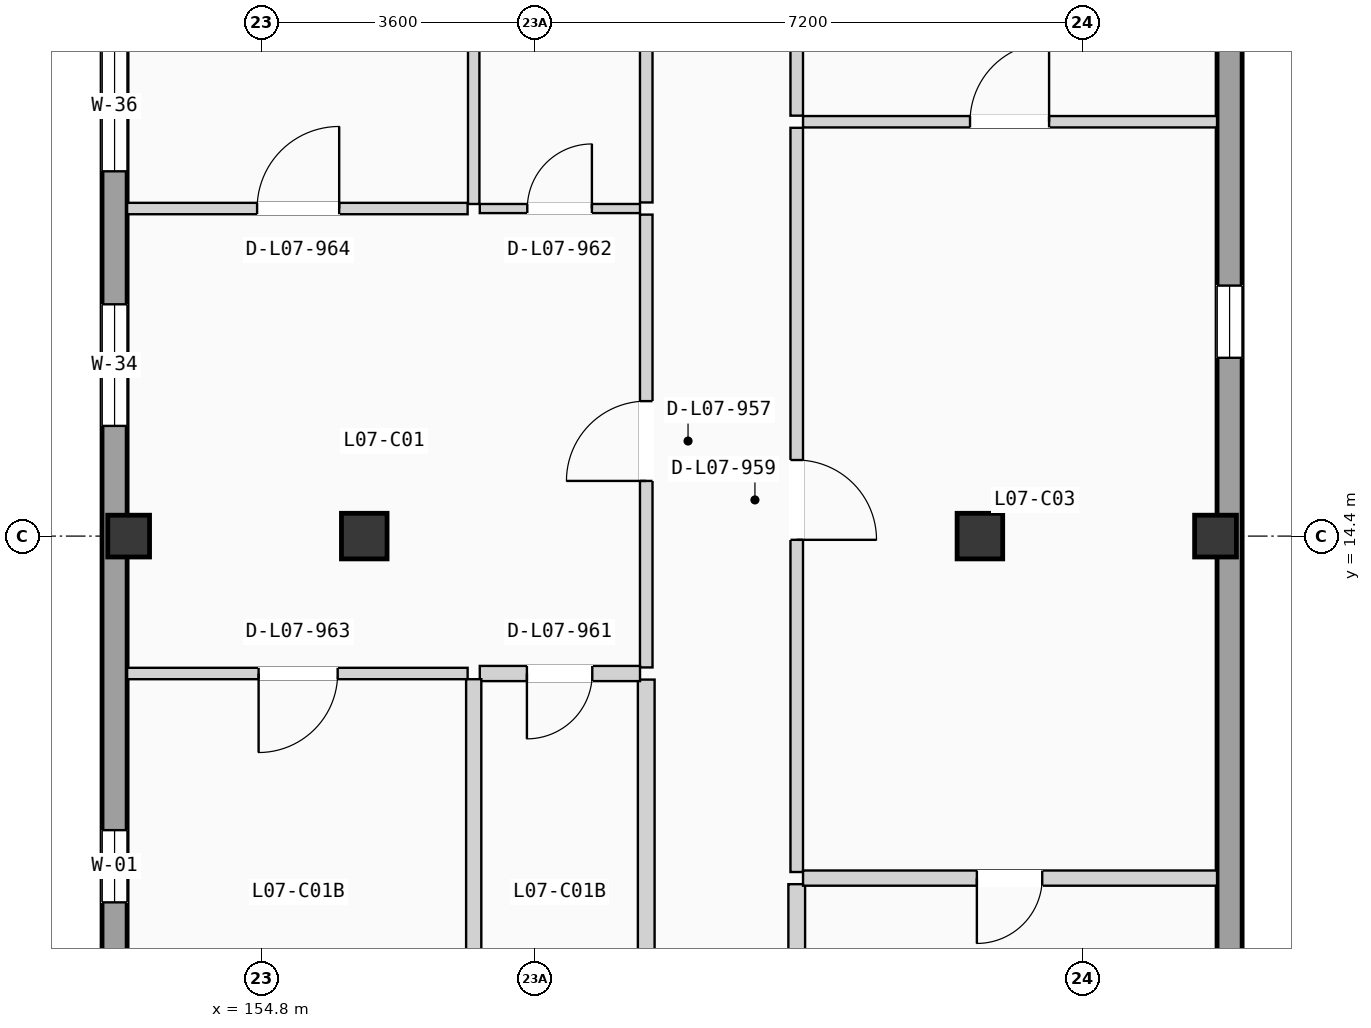
"""IFC4 building model, lengths in metres.
Left out: names, types, materials, properties, quantities, classifications, styles, units other than length and angle.
Written with IfcOpenShell. Run it as: python <this file> out.ifc"""

import sys

from ifc_helpers import new_model, si_unit, direction, frame, frame_2d, origin, origin_2d, place, context, subcontext, project, spatial, rectangle, extrude, element, fill, save


model = new_model("IFC4")
c1 = context("Model", 3, precision=1e-05, world=origin(), true_north=direction((0.0, 1.0)))
c2 = subcontext(c1, "Body", "Model", "MODEL_VIEW")
j1 = project(units=[si_unit("LENGTHUNIT", "METRE"), si_unit("PLANEANGLEUNIT", "RADIAN")], contexts=[c1])
p1 = place(None, origin())
s1 = spatial("IfcSite", under=j1, at=p1, CompositionType="ELEMENT")
p2 = place(p1, origin())
s2 = spatial("IfcBuilding", under=s1, at=p2, CompositionType="ELEMENT")
p3 = place(p2, frame((0.0, 0.0, 24.675)))
s3 = spatial("IfcBuildingStorey", under=s2, at=p3, CompositionType="ELEMENT", Elevation=24.675)
p4 = place(p3, frame((153.05, 14.4, 0.0), z_axis=(0.0, 0.0, 1.0), x_axis=(1.0, 0.0, 0.0)))
e1 = element("IfcColumn", 1, at=p4, inside=s3, PredefinedType="COLUMN", context=c2, shape_type="SweptSolid", body=[
    extrude(rectangle(XDim=0.55, YDim=0.55, at=origin_2d()), origin(), (0.0, 0.0, 1.0), 3.15),
])
for number, where, z_axis, x_axis in (
    (2, (156.15, 14.4, 0.0), (0.0, 0.0, 1.0), (1.0, 0.0, 0.0)),
    (3, (164.25, 14.4, 0.0), (0.0, 0.0, 1.0), (1.0, 0.0, 0.0)),
):
    element("IfcColumn", number, at=place(p3, frame(where, z_axis=z_axis, x_axis=x_axis)), inside=s3, PredefinedType="COLUMN", context=c2, shape_type="SweptSolid", body=[
        extrude(rectangle(XDim=0.6, YDim=0.6, at=origin_2d()), origin(), (0.0, 0.0, 1.0), 3.15),
    ])
p5 = place(p3, frame((167.35, 14.4, 0.0), z_axis=(0.0, 0.0, 1.0), x_axis=(1.0, 0.0, 0.0)))
e4 = element("IfcColumn", 4, at=p5, inside=s3, PredefinedType="COLUMN", context=c2, shape_type="SweptSolid", body=[
    extrude(rectangle(XDim=0.55, YDim=0.55, at=origin_2d()), origin(), (0.0, 0.0, 1.0), 3.15),
])
p6 = place(p3, frame((152.865, 0.33, 0.0), z_axis=(0.0, 0.0, 1.0), x_axis=(0.0, 1.0, 0.0)))
e5 = element("IfcWall", 5, at=p6, inside=s3, PredefinedType="SOLIDWALL", context=c2, shape_type="SweptSolid", body=[
    extrude(rectangle(XDim=49.74, YDim=0.33, at=frame_2d((24.87, 0.0))), origin(), (0.0, 0.0, 1.0), 2.9),
])
p7 = place(p6, frame((15.52, 0.0, 0.565)))
e6 = element("IfcOpeningElement", 6, at=p7, cuts=e5, PredefinedType="OPENING", context=c2, shape_type="SweptSolid", body=[
    extrude(rectangle(XDim=1.6, YDim=1.65, at=frame_2d((0.8, 0.825))), frame((0.0, 0.175, 0.0), z_axis=(0.0, -1.0, 0.0), x_axis=(1.0, 0.0, 0.0)), (0.0, 0.0, 1.0), 0.35),
])
p8 = place(p6, frame((9.251, 0.0, 0.85)))
e7 = element("IfcOpeningElement", 7, at=p8, cuts=e5, PredefinedType="OPENING", context=c2, shape_type="SweptSolid", body=[
    extrude(rectangle(XDim=0.95, YDim=1.2, at=frame_2d((0.475, 0.6))), frame((0.0, 0.175, 0.0), z_axis=(0.0, -1.0, 0.0), x_axis=(1.0, 0.0, 0.0)), (0.0, 0.0, 1.0), 0.35),
])
p9 = place(p6, frame((18.87, 0.0, 0.9)))
e8 = element("IfcOpeningElement", 8, at=p9, cuts=e5, PredefinedType="OPENING", context=c2, shape_type="SweptSolid", body=[
    extrude(rectangle(XDim=1.72, YDim=1.2, at=frame_2d((0.86, 0.6))), frame((0.0, 0.175, 0.0), z_axis=(0.0, -1.0, 0.0), x_axis=(1.0, 0.0, 0.0)), (0.0, 0.0, 1.0), 0.35),
])
p10 = place(p6, frame((31.588, 0.0, 0.865)))
e9 = element("IfcOpeningElement", 9, at=p10, cuts=e5, PredefinedType="OPENING", context=c2, shape_type="SweptSolid", body=[
    extrude(rectangle(XDim=1.72, YDim=1.35, at=frame_2d((0.86, 0.675))), frame((0.0, 0.175, 0.0), z_axis=(0.0, -1.0, 0.0), x_axis=(1.0, 0.0, 0.0)), (0.0, 0.0, 1.0), 0.35),
])
p11 = place(p6, frame((25.016, 0.0, 0.715)))
e10 = element("IfcOpeningElement", 10, at=p11, cuts=e5, PredefinedType="OPENING", context=c2, shape_type="SweptSolid", body=[
    extrude(rectangle(XDim=1.72, YDim=1.5, at=frame_2d((0.86, 0.75))), frame((0.0, 0.175, 0.0), z_axis=(0.0, -1.0, 0.0), x_axis=(1.0, 0.0, 0.0)), (0.0, 0.0, 1.0), 0.35),
])
p12 = place(p6, frame((38.718, 0.0, 0.565)))
e11 = element("IfcOpeningElement", 11, at=p12, cuts=e5, PredefinedType="OPENING", context=c2, shape_type="SweptSolid", body=[
    extrude(rectangle(XDim=1.72, YDim=1.65, at=frame_2d((0.86, 0.825))), frame((0.0, 0.175, 0.0), z_axis=(0.0, -1.0, 0.0), x_axis=(1.0, 0.0, 0.0)), (0.0, 0.0, 1.0), 0.35),
])
p13 = place(p3, frame((167.535, 0.33, 0.0), z_axis=(0.0, 0.0, 1.0), x_axis=(0.0, 1.0, 0.0)))
e12 = element("IfcWall", 12, at=p13, inside=s3, PredefinedType="SOLIDWALL", context=c2, shape_type="SweptSolid", body=[
    extrude(rectangle(XDim=49.74, YDim=0.33, at=frame_2d((24.87, 0.0))), origin(), (0.0, 0.0, 1.0), 2.9),
])
p14 = place(p13, frame((16.416, 0.0, 0.85)))
e13 = element("IfcOpeningElement", 13, at=p14, cuts=e12, PredefinedType="OPENING", context=c2, shape_type="SweptSolid", body=[
    extrude(rectangle(XDim=0.95, YDim=1.2, at=frame_2d((0.475, 0.6))), frame((0.0, 0.175, 0.0), z_axis=(0.0, -1.0, 0.0), x_axis=(1.0, 0.0, 0.0)), (0.0, 0.0, 1.0), 0.35),
])
p15 = place(p13, frame((21.981, 0.0, 0.85)))
e14 = element("IfcOpeningElement", 14, at=p15, cuts=e12, PredefinedType="OPENING", context=c2, shape_type="SweptSolid", body=[
    extrude(rectangle(XDim=0.95, YDim=1.2, at=frame_2d((0.475, 0.6))), frame((0.0, 0.175, 0.0), z_axis=(0.0, -1.0, 0.0), x_axis=(1.0, 0.0, 0.0)), (0.0, 0.0, 1.0), 0.35),
])
p16 = place(p13, frame((31.145, 0.0, 0.865)))
e15 = element("IfcOpeningElement", 15, at=p16, cuts=e12, PredefinedType="OPENING", context=c2, shape_type="SweptSolid", body=[
    extrude(rectangle(XDim=1.85, YDim=1.35, at=frame_2d((0.925, 0.675))), frame((0.0, 0.175, 0.0), z_axis=(0.0, -1.0, 0.0), x_axis=(1.0, 0.0, 0.0)), (0.0, 0.0, 1.0), 0.35),
])
p17 = place(p3, frame((159.86, 12.672, 0.0), z_axis=(0.0, 0.0, 1.0), x_axis=(0.0, 1.0, 0.0)))
e16 = element("IfcWall", 16, at=p17, inside=s3, PredefinedType="PARTITIONING", context=c2, shape_type="SweptSolid", body=[
    extrude(rectangle(XDim=5.958, YDim=0.165, at=frame_2d((2.979, 0.0))), origin(), (0.0, 0.0, 1.0), 2.87),
])
p18 = place(p17, frame((2.454, 0.0, 0.0)))
e17 = element("IfcOpeningElement", 17, at=p18, cuts=e16, PredefinedType="OPENING", context=c2, shape_type="SweptSolid", body=[
    extrude(rectangle(XDim=1.05, YDim=2.13, at=frame_2d((0.525, 1.065))), frame((0.0, 0.093, 0.0), z_axis=(0.0, -1.0, 0.0), x_axis=(1.0, 0.0, 0.0)), (0.0, 0.0, 1.0), 0.185),
])
p19 = place(p3, frame((159.86, 7.6, 0.0), z_axis=(0.0, 0.0, 1.0), x_axis=(0.0, 1.0, 0.0)))
e18 = element("IfcWall", 18, at=p19, inside=s3, PredefinedType="PLUMBINGWALL", context=c2, shape_type="SweptSolid", body=[
    extrude(rectangle(XDim=4.912, YDim=0.22, at=frame_2d((2.456, 0.0))), origin(), (0.0, 0.0, 1.0), 2.87),
])
p20 = place(p3, frame((159.86, 18.79, 0.0), z_axis=(0.0, 0.0, 1.0), x_axis=(0.0, 1.0, 0.0)))
e19 = element("IfcWall", 19, at=p20, inside=s3, PredefinedType="PARTITIONING", context=c2, shape_type="SweptSolid", body=[
    extrude(rectangle(XDim=4.912, YDim=0.165, at=frame_2d((2.456, 0.0))), origin(), (0.0, 0.0, 1.0), 2.87),
])
p21 = place(p3, frame((161.84, 7.575, 0.0), z_axis=(0.0, 0.0, 1.0), x_axis=(0.0, 1.0, 0.0)))
e20 = element("IfcWall", 20, at=p21, inside=s3, PredefinedType="PLUMBINGWALL", context=c2, shape_type="SweptSolid", body=[
    extrude(rectangle(XDim=2.245, YDim=0.22, at=frame_2d((1.123, 0.0))), origin(), (0.0, 0.0, 1.0), 2.87),
])
p22 = place(p3, frame((161.84, 9.98, 0.0), z_axis=(0.0, 0.0, 1.0), x_axis=(0.0, 1.0, 0.0)))
e21 = element("IfcWall", 21, at=p22, inside=s3, PredefinedType="PARTITIONING", context=c2, shape_type="SweptSolid", body=[
    extrude(rectangle(XDim=9.792, YDim=0.165, at=frame_2d((4.896, 0.0))), origin(), (0.0, 0.0, 1.0), 2.87),
])
p23 = place(p22, frame((4.371, 0.0, 0.0)))
e22 = element("IfcOpeningElement", 22, at=p23, cuts=e21, PredefinedType="OPENING", context=c2, shape_type="SweptSolid", body=[
    extrude(rectangle(XDim=1.05, YDim=2.13, at=frame_2d((0.525, 1.065))), frame((0.0, 0.093, 0.0), z_axis=(0.0, -1.0, 0.0), x_axis=(1.0, 0.0, 0.0)), (0.0, 0.0, 1.0), 0.185),
])
p24 = place(p3, frame((161.84, 19.932, 0.0), z_axis=(0.0, 0.0, 1.0), x_axis=(0.0, 1.0, 0.0)))
e23 = element("IfcWall", 23, at=p24, inside=s3, PredefinedType="PARTITIONING", context=c2, shape_type="SweptSolid", body=[
    extrude(rectangle(XDim=3.77, YDim=0.165, at=frame_2d((1.885, 0.0))), origin(), (0.0, 0.0, 1.0), 2.87),
])
p25 = place(p3, frame((157.67, 12.592, 0.0), z_axis=(0.0, 0.0, 1.0), x_axis=(1.0, 0.0, 0.0)))
e24 = element("IfcWall", 24, at=p25, inside=s3, PredefinedType="PLUMBINGWALL", context=c2, shape_type="SweptSolid", body=[
    extrude(rectangle(XDim=2.108, YDim=0.2, at=frame_2d((1.054, 0.0))), origin(), (0.0, 0.0, 1.0), 2.87),
])
p26 = place(p25, frame((0.62, 0.0, 0.0)))
e25 = element("IfcOpeningElement", 25, at=p26, cuts=e24, PredefinedType="OPENING", context=c2, shape_type="SweptSolid", body=[
    extrude(rectangle(XDim=0.86, YDim=2.0, at=frame_2d((0.43, 1.0))), frame((0.0, 0.11, 0.0), z_axis=(0.0, -1.0, 0.0), x_axis=(1.0, 0.0, 0.0)), (0.0, 0.0, 1.0), 0.22),
])
p27 = place(p3, frame((157.67, 18.71, 0.0), z_axis=(0.0, 0.0, 1.0), x_axis=(1.0, 0.0, 0.0)))
e26 = element("IfcWall", 26, at=p27, inside=s3, PredefinedType="PARTITIONING", context=c2, shape_type="SweptSolid", body=[
    extrude(rectangle(XDim=2.108, YDim=0.12, at=frame_2d((1.054, 0.0))), origin(), (0.0, 0.0, 1.0), 2.87),
])
p28 = place(p27, frame((0.625, 0.0, 0.0)))
e27 = element("IfcOpeningElement", 27, at=p28, cuts=e26, PredefinedType="OPENING", context=c2, shape_type="SweptSolid", body=[
    extrude(rectangle(XDim=0.85, YDim=2.01, at=frame_2d((0.425, 1.005))), frame((0.0, 0.07, 0.0), z_axis=(0.0, -1.0, 0.0), x_axis=(1.0, 0.0, 0.0)), (0.0, 0.0, 1.0), 0.14),
])
p29 = place(p3, frame((153.03, 12.592, 0.0), z_axis=(0.0, 0.0, 1.0), x_axis=(1.0, 0.0, 0.0)))
e28 = element("IfcWall", 28, at=p29, inside=s3, PredefinedType="PARTITIONING", context=c2, shape_type="SweptSolid", body=[
    extrude(rectangle(XDim=4.48, YDim=0.15, at=frame_2d((2.24, 0.0))), origin(), (0.0, 0.0, 1.0), 2.87),
])
p30 = place(p29, frame((1.73, 0.0, 0.0)))
e29 = element("IfcOpeningElement", 29, at=p30, cuts=e28, PredefinedType="OPENING", context=c2, shape_type="SweptSolid", body=[
    extrude(rectangle(XDim=1.04, YDim=2.08, at=frame_2d((0.52, 1.04))), frame((0.0, 0.085, 0.0), z_axis=(0.0, -1.0, 0.0), x_axis=(1.0, 0.0, 0.0)), (0.0, 0.0, 1.0), 0.17),
])
p31 = place(p3, frame((153.03, 18.71, 0.0), z_axis=(0.0, 0.0, 1.0), x_axis=(1.0, 0.0, 0.0)))
e30 = element("IfcWall", 30, at=p31, inside=s3, PredefinedType="PARTITIONING", context=c2, shape_type="SweptSolid", body=[
    extrude(rectangle(XDim=4.48, YDim=0.15, at=frame_2d((2.24, 0.0))), origin(), (0.0, 0.0, 1.0), 2.87),
])
p32 = place(p31, frame((1.71, 0.0, 0.0)))
e31 = element("IfcOpeningElement", 31, at=p32, cuts=e30, PredefinedType="OPENING", context=c2, shape_type="SweptSolid", body=[
    extrude(rectangle(XDim=1.08, YDim=2.1, at=frame_2d((0.54, 1.05))), frame((0.0, 0.085, 0.0), z_axis=(0.0, -1.0, 0.0), x_axis=(1.0, 0.0, 0.0)), (0.0, 0.0, 1.0), 0.17),
])
p33 = place(p3, frame((157.59, 7.6, 0.0), z_axis=(0.0, 0.0, 1.0), x_axis=(0.0, 1.0, 0.0)))
e32 = element("IfcWall", 32, at=p33, inside=s3, PredefinedType="PLUMBINGWALL", context=c2, shape_type="SweptSolid", body=[
    extrude(rectangle(XDim=4.917, YDim=0.2, at=frame_2d((2.458, 0.0))), origin(), (0.0, 0.0, 1.0), 2.87),
])
p34 = place(p3, frame((157.59, 18.77, 0.0), z_axis=(0.0, 0.0, 1.0), x_axis=(0.0, 1.0, 0.0)))
e33 = element("IfcWall", 33, at=p34, inside=s3, PredefinedType="PARTITIONING", context=c2, shape_type="SweptSolid", body=[
    extrude(rectangle(XDim=4.932, YDim=0.15, at=frame_2d((2.466, 0.0))), origin(), (0.0, 0.0, 1.0), 2.87),
])
p35 = place(p3, frame((161.923, 9.9, 0.0), z_axis=(0.0, 0.0, 1.0), x_axis=(1.0, 0.0, 0.0)))
e34 = element("IfcWall", 34, at=p35, inside=s3, PredefinedType="PLUMBINGWALL", context=c2, shape_type="SweptSolid", body=[
    extrude(rectangle(XDim=5.447, YDim=0.2, at=frame_2d((2.724, 0.0))), origin(), (0.0, 0.0, 1.0), 2.87),
])
p36 = place(p35, frame((2.287, 0.0, 0.0)))
e35 = element("IfcOpeningElement", 35, at=p36, cuts=e34, PredefinedType="OPENING", context=c2, shape_type="SweptSolid", body=[
    extrude(rectangle(XDim=0.86, YDim=2.0, at=frame_2d((0.43, 1.0))), frame((0.0, 0.11, 0.0), z_axis=(0.0, -1.0, 0.0), x_axis=(1.0, 0.0, 0.0)), (0.0, 0.0, 1.0), 0.22),
])
p37 = place(p3, frame((161.923, 19.852, 0.0), z_axis=(0.0, 0.0, 1.0), x_axis=(1.0, 0.0, 0.0)))
e36 = element("IfcWall", 36, at=p37, inside=s3, PredefinedType="PARTITIONING", context=c2, shape_type="SweptSolid", body=[
    extrude(rectangle(XDim=5.447, YDim=0.15, at=frame_2d((2.724, 0.0))), origin(), (0.0, 0.0, 1.0), 2.87),
])
p38 = place(p37, frame((2.197, 0.0, 0.0)))
e37 = element("IfcOpeningElement", 37, at=p38, cuts=e36, PredefinedType="OPENING", context=c2, shape_type="SweptSolid", body=[
    extrude(rectangle(XDim=1.04, YDim=2.08, at=frame_2d((0.52, 1.04))), frame((0.0, 0.085, 0.0), z_axis=(0.0, -1.0, 0.0), x_axis=(1.0, 0.0, 0.0)), (0.0, 0.0, 1.0), 0.17),
])
p39 = place(p7, origin())
e38 = element("IfcWindow", 38, at=p39, inside=s3, PartitioningType="DOUBLE_PANEL_VERTICAL", PredefinedType="WINDOW", context=c2, shape_type="SweptSolid", body=[
    extrude(rectangle(XDim=1.6, YDim=1.65, at=frame_2d((0.8, 0.825))), frame((0.0, 0.03, 0.0), z_axis=(0.0, -1.0, 0.0), x_axis=(1.0, 0.0, 0.0)), (0.0, 0.0, 1.0), 0.06),
])
fill(e6, e38)
p40 = place(p8, origin())
e39 = element("IfcWindow", 39, at=p40, inside=s3, PartitioningType="SINGLE_PANEL", PredefinedType="WINDOW", context=c2, shape_type="SweptSolid", body=[
    extrude(rectangle(XDim=0.95, YDim=1.2, at=frame_2d((0.475, 0.6))), frame((0.0, 0.03, 0.0), z_axis=(0.0, -1.0, 0.0), x_axis=(1.0, 0.0, 0.0)), (0.0, 0.0, 1.0), 0.06),
])
fill(e7, e39)
p41 = place(p9, origin())
e40 = element("IfcWindow", 40, at=p41, inside=s3, PartitioningType="DOUBLE_PANEL_VERTICAL", PredefinedType="WINDOW", context=c2, shape_type="SweptSolid", body=[
    extrude(rectangle(XDim=1.72, YDim=1.2, at=frame_2d((0.86, 0.6))), frame((0.0, 0.03, 0.0), z_axis=(0.0, -1.0, 0.0), x_axis=(1.0, 0.0, 0.0)), (0.0, 0.0, 1.0), 0.06),
])
fill(e8, e40)
p42 = place(p14, origin())
e41 = element("IfcWindow", 41, at=p42, inside=s3, PartitioningType="SINGLE_PANEL", PredefinedType="WINDOW", context=c2, shape_type="SweptSolid", body=[
    extrude(rectangle(XDim=0.95, YDim=1.2, at=frame_2d((0.475, 0.6))), frame((0.0, 0.03, 0.0), z_axis=(0.0, -1.0, 0.0), x_axis=(1.0, 0.0, 0.0)), (0.0, 0.0, 1.0), 0.06),
])
fill(e13, e41)
p43 = place(p18, origin())
e42 = element("IfcDoor", 42, at=p43, inside=s3, OperationType="SINGLE_SWING_LEFT", PredefinedType="DOOR", context=c2, shape_type="SweptSolid", body=[
    extrude(rectangle(XDim=1.05, YDim=2.13, at=frame_2d((0.525, 1.065))), frame((0.0, 0.025, 0.0), z_axis=(0.0, -1.0, 0.0), x_axis=(1.0, 0.0, 0.0)), (0.0, 0.0, 1.0), 0.05),
])
fill(e17, e42)
p44 = place(p23, frame((1.05, 0.0, 0.0), z_axis=(0.0, 0.0, 1.0), x_axis=(-1.0, 0.0, 0.0)))
e43 = element("IfcDoor", 43, at=p44, inside=s3, OperationType="SINGLE_SWING_LEFT", PredefinedType="DOOR", context=c2, shape_type="SweptSolid", body=[
    extrude(rectangle(XDim=1.05, YDim=2.13, at=frame_2d((0.525, 1.065))), frame((0.0, 0.025, 0.0), z_axis=(0.0, -1.0, 0.0), x_axis=(1.0, 0.0, 0.0)), (0.0, 0.0, 1.0), 0.05),
])
fill(e22, e43)
p45 = place(p26, frame((0.86, 0.0, 0.0), z_axis=(0.0, 0.0, 1.0), x_axis=(-1.0, 0.0, 0.0)))
e44 = element("IfcDoor", 44, at=p45, inside=s3, OperationType="SINGLE_SWING_LEFT", PredefinedType="DOOR", context=c2, shape_type="SweptSolid", body=[
    extrude(rectangle(XDim=0.86, YDim=2.0, at=frame_2d((0.43, 1.0))), frame((0.0, 0.025, 0.0), z_axis=(0.0, -1.0, 0.0), x_axis=(1.0, 0.0, 0.0)), (0.0, 0.0, 1.0), 0.05),
])
fill(e25, e44)
p46 = place(p28, origin())
e45 = element("IfcDoor", 45, at=p46, inside=s3, OperationType="SINGLE_SWING_RIGHT", PredefinedType="DOOR", context=c2, shape_type="SweptSolid", body=[
    extrude(rectangle(XDim=0.85, YDim=2.01, at=frame_2d((0.425, 1.005))), frame((0.0, 0.025, 0.0), z_axis=(0.0, -1.0, 0.0), x_axis=(1.0, 0.0, 0.0)), (0.0, 0.0, 1.0), 0.05),
])
fill(e27, e45)
p47 = place(p30, frame((1.04, 0.0, 0.0), z_axis=(0.0, 0.0, 1.0), x_axis=(-1.0, 0.0, 0.0)))
e46 = element("IfcDoor", 46, at=p47, inside=s3, OperationType="SINGLE_SWING_LEFT", PredefinedType="DOOR", context=c2, shape_type="SweptSolid", body=[
    extrude(rectangle(XDim=1.04, YDim=2.08, at=frame_2d((0.52, 1.04))), frame((0.0, 0.025, 0.0), z_axis=(0.0, -1.0, 0.0), x_axis=(1.0, 0.0, 0.0)), (0.0, 0.0, 1.0), 0.05),
])
fill(e29, e46)
p48 = place(p32, origin())
e47 = element("IfcDoor", 47, at=p48, inside=s3, OperationType="SINGLE_SWING_RIGHT", PredefinedType="DOOR", context=c2, shape_type="SweptSolid", body=[
    extrude(rectangle(XDim=1.08, YDim=2.1, at=frame_2d((0.54, 1.05))), frame((0.0, 0.025, 0.0), z_axis=(0.0, -1.0, 0.0), x_axis=(1.0, 0.0, 0.0)), (0.0, 0.0, 1.0), 0.05),
])
fill(e31, e47)
p49 = place(p36, frame((0.86, 0.0, 0.0), z_axis=(0.0, 0.0, 1.0), x_axis=(-1.0, 0.0, 0.0)))
e48 = element("IfcDoor", 48, at=p49, inside=s3, OperationType="SINGLE_SWING_LEFT", PredefinedType="DOOR", context=c2, shape_type="SweptSolid", body=[
    extrude(rectangle(XDim=0.86, YDim=2.0, at=frame_2d((0.43, 1.0))), frame((0.0, 0.025, 0.0), z_axis=(0.0, -1.0, 0.0), x_axis=(1.0, 0.0, 0.0)), (0.0, 0.0, 1.0), 0.05),
])
fill(e35, e48)
p50 = place(p38, origin())
e49 = element("IfcDoor", 49, at=p50, inside=s3, OperationType="SINGLE_SWING_RIGHT", PredefinedType="DOOR", context=c2, shape_type="SweptSolid", body=[
    extrude(rectangle(XDim=1.04, YDim=2.08, at=frame_2d((0.52, 1.04))), frame((0.0, 0.025, 0.0), z_axis=(0.0, -1.0, 0.0), x_axis=(1.0, 0.0, 0.0)), (0.0, 0.0, 1.0), 0.05),
])
fill(e37, e49)
save(model, sys.argv[1])
